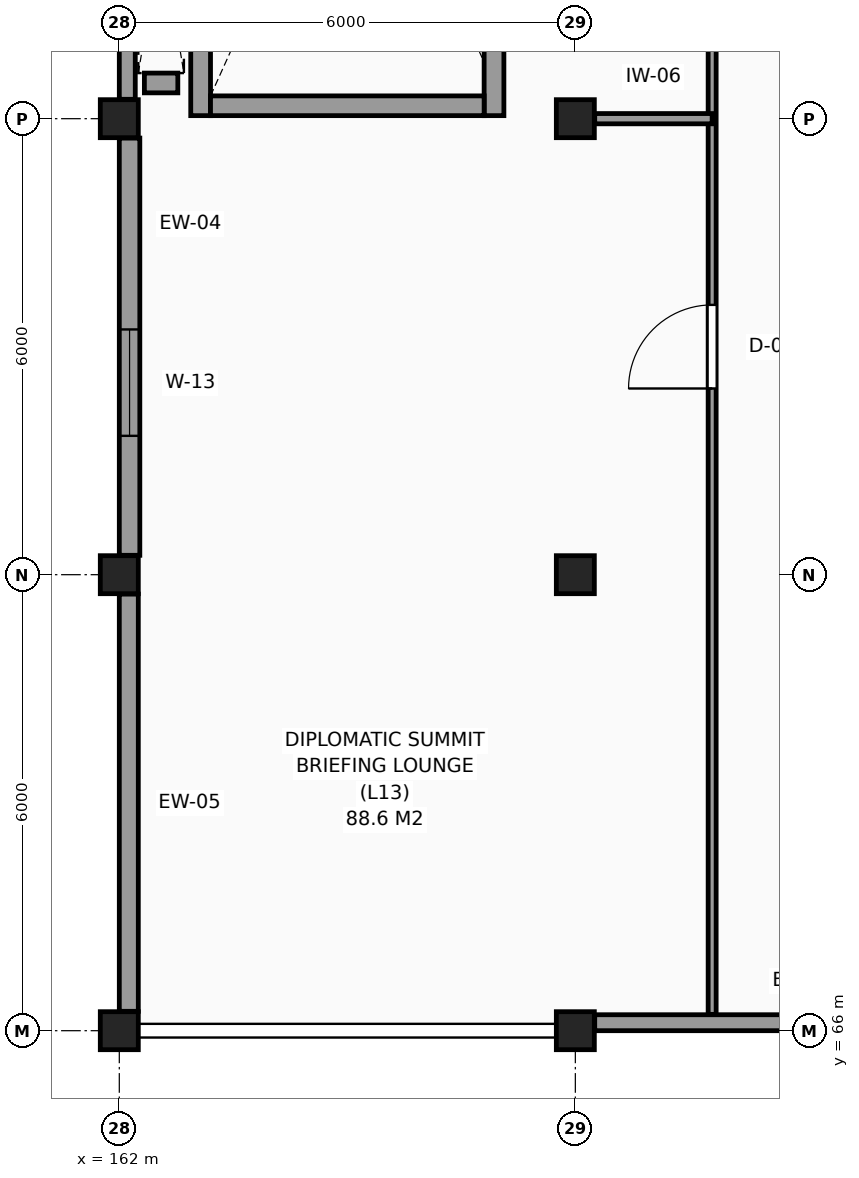
"""IFC4 building model, lengths in metres.
Left out: names, types, materials, properties, quantities, classifications, styles, units other than length and angle.
Written with IfcOpenShell. Run it as: python <this file> out.ifc"""

import sys

from ifc_helpers import new_model, si_unit, direction, frame, frame_2d, origin, origin_2d, place, context, subcontext, project, spatial, rectangle, extrude, element, fill, save


model = new_model("IFC4")
c1 = context("Model", 3, precision=1e-05, world=origin(), true_north=direction((0.0, 1.0)))
c2 = subcontext(c1, "Body", "Model", "MODEL_VIEW")
j1 = project(units=[si_unit("LENGTHUNIT", "METRE"), si_unit("PLANEANGLEUNIT", "RADIAN")], contexts=[c1])
p1 = place(None, origin())
s1 = spatial("IfcSite", under=j1, at=p1, CompositionType="ELEMENT")
p2 = place(p1, origin())
s2 = spatial("IfcBuilding", under=s1, at=p2, CompositionType="ELEMENT")
p3 = place(p2, frame((0.0, 0.0, 51.3)))
s3 = spatial("IfcBuildingStorey", under=s2, at=p3, CompositionType="ELEMENT", Elevation=51.3)
for number, where, z_axis, x_axis in (
    (1, (162.0, 66.0, 0.0), (0.0, 0.0, 1.0), (1.0, 0.0, 0.0)),
    (2, (162.0, 72.0, 0.0), (0.0, 0.0, 1.0), (1.0, 0.0, 0.0)),
    (3, (162.0, 78.0, 0.0), (0.0, 0.0, 1.0), (1.0, 0.0, 0.0)),
    (4, (168.0, 66.0, 0.0), (0.0, 0.0, 1.0), (1.0, 0.0, 0.0)),
    (5, (168.0, 72.0, 0.0), (0.0, 0.0, 1.0), (1.0, 0.0, 0.0)),
    (6, (168.0, 78.0, 0.0), (0.0, 0.0, 1.0), (1.0, 0.0, 0.0)),
):
    element("IfcColumn", number, at=place(p3, frame(where, z_axis=z_axis, x_axis=x_axis)), inside=s3, PredefinedType="COLUMN", context=c2, shape_type="SweptSolid", body=[
        extrude(rectangle(XDim=0.5, YDim=0.5, at=origin_2d()), origin(), (0.0, 0.0, 1.0), 3.3),
    ])
p4 = place(p3, frame((162.105, 83.745, 0.0), z_axis=(0.0, 0.0, 1.0), x_axis=(0.0, -1.0, 0.0)))
e7 = element("IfcWall", 7, at=p4, inside=s3, PredefinedType="SOLIDWALL", context=c2, shape_type="SweptSolid", body=[
    extrude(rectangle(XDim=5.49, YDim=0.21, at=frame_2d((2.745, 0.0))), origin(), (0.0, 0.0, 1.0), 2.61),
])
p5 = place(p3, frame((162.135, 77.745, 0.0), z_axis=(0.0, 0.0, 1.0), x_axis=(0.0, -1.0, 0.0)))
e8 = element("IfcWall", 8, at=p5, inside=s3, PredefinedType="SOLIDWALL", context=c2, shape_type="SweptSolid", body=[
    extrude(rectangle(XDim=5.49, YDim=0.27, at=frame_2d((2.745, 0.0))), origin(), (0.0, 0.0, 1.0), 2.46),
])
p6 = place(p5, frame((2.518, 0.0, 0.8)))
e9 = element("IfcOpeningElement", 9, at=p6, cuts=e8, PredefinedType="OPENING", context=c2, shape_type="SweptSolid", body=[
    extrude(rectangle(XDim=1.4, YDim=1.4, at=frame_2d((0.7, 0.7))), frame((0.0, 0.145, 0.0), z_axis=(0.0, -1.0, 0.0), x_axis=(1.0, 0.0, 0.0)), (0.0, 0.0, 1.0), 0.29),
])
p7 = place(p3, frame((162.125, 71.745, 0.0), z_axis=(0.0, 0.0, 1.0), x_axis=(0.0, -1.0, 0.0)))
e10 = element("IfcWall", 10, at=p7, inside=s3, PredefinedType="SOLIDWALL", context=c2, shape_type="SweptSolid", body=[
    extrude(rectangle(XDim=5.49, YDim=0.25, at=frame_2d((2.745, 0.0))), origin(), (0.0, 0.0, 1.0), 2.61),
])
p8 = place(p3, frame((168.255, 66.105, 0.0), z_axis=(0.0, 0.0, 1.0), x_axis=(1.0, 0.0, 0.0)))
e11 = element("IfcWall", 11, at=p8, inside=s3, PredefinedType="SOLIDWALL", context=c2, shape_type="SweptSolid", body=[
    extrude(rectangle(XDim=5.49, YDim=0.21, at=frame_2d((2.745, 0.0))), origin(), (0.0, 0.0, 1.0), 2.51),
])
for number, where, z_axis, x_axis in (
    (12, (163.07, 78.04, 0.0), (0.0, 0.0, 1.0), (0.0, 1.0, 0.0)),
    (13, (166.93, 78.04, 0.0), (0.0, 0.0, 1.0), (0.0, 1.0, 0.0)),
):
    element("IfcWall", number, at=place(p3, frame(where, z_axis=z_axis, x_axis=x_axis)), inside=s3, PredefinedType="SHEAR", context=c2, shape_type="SweptSolid", body=[
        extrude(rectangle(XDim=10.72, YDim=0.26, at=frame_2d((5.36, 0.0))), origin(), (0.0, 0.0, 1.0), 3.3),
    ])
p9 = place(p3, frame((163.2, 78.17, 0.0), z_axis=(0.0, 0.0, 1.0), x_axis=(1.0, 0.0, 0.0)))
e14 = element("IfcWall", 14, at=p9, inside=s3, PredefinedType="SHEAR", context=c2, shape_type="SweptSolid", body=[
    extrude(rectangle(XDim=3.6, YDim=0.26, at=frame_2d((1.8, 0.0))), origin(), (0.0, 0.0, 1.0), 3.3),
])
p10 = place(p3, frame((162.33, 78.47, 0.0), z_axis=(0.0, 0.0, 1.0), x_axis=(1.0, 0.0, 0.0)))
e15 = element("IfcWall", 15, at=p10, inside=s3, PredefinedType="SHEAR", context=c2, shape_type="SweptSolid", body=[
    extrude(rectangle(XDim=0.44, YDim=0.26, at=frame_2d((0.22, 0.0))), origin(), (0.0, 0.0, 1.0), 3.3),
])
p11 = place(p3, frame((169.8, 66.215, 0.0), z_axis=(0.0, 0.0, 1.0), x_axis=(0.0, 1.0, 0.0)))
e16 = element("IfcWall", 16, at=p11, inside=s3, PredefinedType="PARTITIONING", context=c2, shape_type="SweptSolid", body=[
    extrude(rectangle(XDim=41.605, YDim=0.105, at=frame_2d((20.802, 0.0))), origin(), (0.0, 0.0, 1.0), 3.06),
])
p12 = place(p11, frame((26.185, 0.0, 0.0)))
e17 = element("IfcOpeningElement", 17, at=p12, cuts=e16, PredefinedType="OPENING", context=c2, shape_type="SweptSolid", body=[
    extrude(rectangle(XDim=1.2, YDim=2.2, at=frame_2d((0.6, 1.1))), frame((0.0, 0.062, 0.0), z_axis=(0.0, -1.0, 0.0), x_axis=(1.0, 0.0, 0.0)), (0.0, 0.0, 1.0), 0.125),
])
p13 = place(p11, frame((8.235, 0.0, 0.0)))
e18 = element("IfcOpeningElement", 18, at=p13, cuts=e16, PredefinedType="OPENING", context=c2, shape_type="SweptSolid", body=[
    extrude(rectangle(XDim=1.1, YDim=2.2, at=frame_2d((0.55, 1.1))), frame((0.0, 0.062, 0.0), z_axis=(0.0, -1.0, 0.0), x_axis=(1.0, 0.0, 0.0)), (0.0, 0.0, 1.0), 0.125),
])
p14 = place(p11, frame((37.735, 0.0, 0.0)))
e19 = element("IfcOpeningElement", 19, at=p14, cuts=e16, PredefinedType="OPENING", context=c2, shape_type="SweptSolid", body=[
    extrude(rectangle(XDim=1.1, YDim=2.2, at=frame_2d((0.55, 1.1))), frame((0.0, 0.062, 0.0), z_axis=(0.0, -1.0, 0.0), x_axis=(1.0, 0.0, 0.0)), (0.0, 0.0, 1.0), 0.125),
])
p15 = place(p11, frame((31.085, 0.0, 0.0)))
e20 = element("IfcOpeningElement", 20, at=p15, cuts=e16, PredefinedType="OPENING", context=c2, shape_type="SweptSolid", body=[
    extrude(rectangle(XDim=1.0, YDim=2.15, at=frame_2d((0.5, 1.075))), frame((0.0, 0.062, 0.0), z_axis=(0.0, -1.0, 0.0), x_axis=(1.0, 0.0, 0.0)), (0.0, 0.0, 1.0), 0.125),
])
p16 = place(p3, frame((168.255, 78.0, 0.0), z_axis=(0.0, 0.0, 1.0), x_axis=(1.0, 0.0, 0.0)))
e21 = element("IfcWall", 21, at=p16, inside=s3, PredefinedType="PARTITIONING", context=c2, shape_type="SweptSolid", body=[
    extrude(rectangle(XDim=1.545, YDim=0.135, at=frame_2d((0.772, 0.0))), origin(), (0.0, 0.0, 1.0), 2.51),
])
p17 = place(p6, origin())
e22 = element("IfcWindow", 22, at=p17, inside=s3, PartitioningType="SINGLE_PANEL", PredefinedType="WINDOW", context=c2, shape_type="SweptSolid", body=[
    extrude(rectangle(XDim=1.4, YDim=1.4, at=frame_2d((0.7, 0.7))), frame((0.0, 0.03, 0.0), z_axis=(0.0, -1.0, 0.0), x_axis=(1.0, 0.0, 0.0)), (0.0, 0.0, 1.0), 0.06),
])
fill(e9, e22)
p18 = place(p13, origin())
e23 = element("IfcDoor", 23, at=p18, inside=s3, OperationType="SINGLE_SWING_LEFT", PredefinedType="DOOR", context=c2, shape_type="SweptSolid", body=[
    extrude(rectangle(XDim=1.1, YDim=2.2, at=frame_2d((0.55, 1.1))), frame((0.0, 0.025, 0.0), z_axis=(0.0, -1.0, 0.0), x_axis=(1.0, 0.0, 0.0)), (0.0, 0.0, 1.0), 0.05),
])
fill(e18, e23)
save(model, sys.argv[1])
